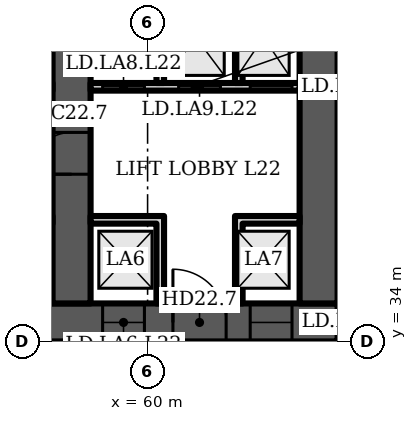
"""IFC4 building model, lengths in metres.
Left out: names, types, materials, properties, quantities, classifications, styles, units other than length and angle.
Written with IfcOpenShell. Run it as: python <this file> out.ifc"""

import sys

from ifc_helpers import new_model, si_unit, direction, frame, frame_2d, origin, place, context, subcontext, project, spatial, polyline, rectangle, outline, extrude, element, fill, save


model = new_model("IFC4")
c1 = context("Model", 3, precision=1e-05, world=origin(), true_north=direction((0.0, 1.0)))
c2 = subcontext(c1, "Body", "Model", "MODEL_VIEW")
j1 = project(units=[si_unit("LENGTHUNIT", "METRE"), si_unit("PLANEANGLEUNIT", "RADIAN")], contexts=[c1])
p1 = place(None, origin())
s1 = spatial("IfcSite", under=j1, at=p1, CompositionType="ELEMENT")
p2 = place(p1, origin())
s2 = spatial("IfcBuilding", under=s1, at=p2, CompositionType="ELEMENT")
p3 = place(p2, frame((0.0, 0.0, 100.3)))
s3 = spatial("IfcBuildingStorey", under=s2, at=p3, CompositionType="ELEMENT", Elevation=100.3)
p4 = place(p3, frame((16.0, 34.5, 0.0), z_axis=(0.0, 0.0, 1.0), x_axis=(1.0, 0.0, 0.0)))
e1 = element("IfcWall", 1, at=p4, inside=s3, PredefinedType="SHEAR", context=c2, shape_type="SweptSolid", body=[
    extrude(rectangle(XDim=49.0, YDim=1.0, at=frame_2d((24.5, 0.0))), origin(), (0.0, 0.0, 1.0), 3.6),
])
p5 = place(p4, frame((1.2, 0.0, 0.0)))
e2 = element("IfcOpeningElement", 2, at=p5, cuts=e1, PredefinedType="OPENING", context=c2, shape_type="SweptSolid", body=[
    extrude(rectangle(XDim=1.1, YDim=2.1, at=frame_2d((0.55, 1.05))), frame((0.0, 0.51, 0.0), z_axis=(0.0, -1.0, 0.0), x_axis=(1.0, 0.0, 0.0)), (0.0, 0.0, 1.0), 1.02),
])
p6 = place(p4, frame((5.083, 0.0, 0.0)))
e3 = element("IfcOpeningElement", 3, at=p6, cuts=e1, PredefinedType="OPENING", context=c2, shape_type="SweptSolid", body=[
    extrude(rectangle(XDim=1.1, YDim=2.1, at=frame_2d((0.55, 1.05))), frame((0.0, 0.51, 0.0), z_axis=(0.0, -1.0, 0.0), x_axis=(1.0, 0.0, 0.0)), (0.0, 0.0, 1.0), 1.02),
])
p7 = place(p4, frame((2.933, 0.0, 0.0)))
e4 = element("IfcOpeningElement", 4, at=p7, cuts=e1, PredefinedType="OPENING", context=c2, shape_type="SweptSolid", body=[
    extrude(rectangle(XDim=1.4, YDim=2.1, at=frame_2d((0.7, 1.05))), frame((0.0, 0.51, 0.0), z_axis=(0.0, -1.0, 0.0), x_axis=(1.0, 0.0, 0.0)), (0.0, 0.0, 1.0), 1.02),
])
p8 = place(p4, frame((7.65, 0.0, 0.0)))
e5 = element("IfcOpeningElement", 5, at=p8, cuts=e1, PredefinedType="OPENING", context=c2, shape_type="SweptSolid", body=[
    extrude(rectangle(XDim=1.2, YDim=2.1, at=frame_2d((0.6, 1.05))), frame((0.0, 0.51, 0.0), z_axis=(0.0, -1.0, 0.0), x_axis=(1.0, 0.0, 0.0)), (0.0, 0.0, 1.0), 1.02),
])
p9 = place(p4, frame((14.817, 0.0, 0.0)))
e6 = element("IfcOpeningElement", 6, at=p9, cuts=e1, PredefinedType="OPENING", context=c2, shape_type="SweptSolid", body=[
    extrude(rectangle(XDim=1.1, YDim=2.1, at=frame_2d((0.55, 1.05))), frame((0.0, 0.51, 0.0), z_axis=(0.0, -1.0, 0.0), x_axis=(1.0, 0.0, 0.0)), (0.0, 0.0, 1.0), 1.02),
])
p10 = place(p4, frame((19.083, 0.0, 0.0)))
e7 = element("IfcOpeningElement", 7, at=p10, cuts=e1, PredefinedType="OPENING", context=c2, shape_type="SweptSolid", body=[
    extrude(rectangle(XDim=1.1, YDim=2.1, at=frame_2d((0.55, 1.05))), frame((0.0, 0.51, 0.0), z_axis=(0.0, -1.0, 0.0), x_axis=(1.0, 0.0, 0.0)), (0.0, 0.0, 1.0), 1.02),
])
p11 = place(p4, frame((16.8, 0.0, 0.0)))
e8 = element("IfcOpeningElement", 8, at=p11, cuts=e1, PredefinedType="OPENING", context=c2, shape_type="SweptSolid", body=[
    extrude(rectangle(XDim=1.4, YDim=2.1, at=frame_2d((0.7, 1.05))), frame((0.0, 0.51, 0.0), z_axis=(0.0, -1.0, 0.0), x_axis=(1.0, 0.0, 0.0)), (0.0, 0.0, 1.0), 1.02),
])
p12 = place(p4, frame((21.817, 0.0, 0.0)))
e9 = element("IfcOpeningElement", 9, at=p12, cuts=e1, PredefinedType="OPENING", context=c2, shape_type="SweptSolid", body=[
    extrude(rectangle(XDim=1.1, YDim=2.1, at=frame_2d((0.55, 1.05))), frame((0.0, 0.51, 0.0), z_axis=(0.0, -1.0, 0.0), x_axis=(1.0, 0.0, 0.0)), (0.0, 0.0, 1.0), 1.02),
])
p13 = place(p4, frame((26.083, 0.0, 0.0)))
e10 = element("IfcOpeningElement", 10, at=p13, cuts=e1, PredefinedType="OPENING", context=c2, shape_type="SweptSolid", body=[
    extrude(rectangle(XDim=1.1, YDim=2.1, at=frame_2d((0.55, 1.05))), frame((0.0, 0.51, 0.0), z_axis=(0.0, -1.0, 0.0), x_axis=(1.0, 0.0, 0.0)), (0.0, 0.0, 1.0), 1.02),
])
p14 = place(p4, frame((33.15, 0.0, 0.0)))
e11 = element("IfcOpeningElement", 11, at=p14, cuts=e1, PredefinedType="OPENING", context=c2, shape_type="SweptSolid", body=[
    extrude(rectangle(XDim=1.2, YDim=2.1, at=frame_2d((0.6, 1.05))), frame((0.0, 0.51, 0.0), z_axis=(0.0, -1.0, 0.0), x_axis=(1.0, 0.0, 0.0)), (0.0, 0.0, 1.0), 1.02),
])
p15 = place(p4, frame((37.8, 0.0, 0.0)))
e12 = element("IfcOpeningElement", 12, at=p15, cuts=e1, PredefinedType="OPENING", context=c2, shape_type="SweptSolid", body=[
    extrude(rectangle(XDim=1.4, YDim=2.1, at=frame_2d((0.7, 1.05))), frame((0.0, 0.51, 0.0), z_axis=(0.0, -1.0, 0.0), x_axis=(1.0, 0.0, 0.0)), (0.0, 0.0, 1.0), 1.02),
])
p16 = place(p4, frame((42.817, 0.0, 0.0)))
e13 = element("IfcOpeningElement", 13, at=p16, cuts=e1, PredefinedType="OPENING", context=c2, shape_type="SweptSolid", body=[
    extrude(rectangle(XDim=1.1, YDim=2.1, at=frame_2d((0.55, 1.05))), frame((0.0, 0.51, 0.0), z_axis=(0.0, -1.0, 0.0), x_axis=(1.0, 0.0, 0.0)), (0.0, 0.0, 1.0), 1.02),
])
p17 = place(p4, frame((46.7, 0.0, 0.0)))
e14 = element("IfcOpeningElement", 14, at=p17, cuts=e1, PredefinedType="OPENING", context=c2, shape_type="SweptSolid", body=[
    extrude(rectangle(XDim=1.1, YDim=2.1, at=frame_2d((0.55, 1.05))), frame((0.0, 0.51, 0.0), z_axis=(0.0, -1.0, 0.0), x_axis=(1.0, 0.0, 0.0)), (0.0, 0.0, 1.0), 1.02),
])
p18 = place(p4, frame((44.667, 0.0, 0.0)))
e15 = element("IfcOpeningElement", 15, at=p18, cuts=e1, PredefinedType="OPENING", context=c2, shape_type="SweptSolid", body=[
    extrude(rectangle(XDim=1.4, YDim=2.1, at=frame_2d((0.7, 1.05))), frame((0.0, 0.51, 0.0), z_axis=(0.0, -1.0, 0.0), x_axis=(1.0, 0.0, 0.0)), (0.0, 0.0, 1.0), 1.02),
])
p19 = place(p3, frame((58.0, 35.0, 0.0), z_axis=(0.0, 0.0, 1.0), x_axis=(0.0, 1.0, 0.0)))
e16 = element("IfcWall", 16, at=p19, inside=s3, PredefinedType="SHEAR", context=c2, shape_type="SweptSolid", body=[
    extrude(rectangle(XDim=13.352, YDim=1.0, at=frame_2d((6.676, 0.0))), origin(), (0.0, 0.0, 1.0), 3.6),
])
p20 = place(p19, frame((10.426, 0.0, 0.0)))
e17 = element("IfcOpeningElement", 17, at=p20, cuts=e16, PredefinedType="OPENING", context=c2, shape_type="SweptSolid", body=[
    extrude(rectangle(XDim=1.0, YDim=2.1, at=frame_2d((0.5, 1.05))), frame((0.0, 0.51, 0.0), z_axis=(0.0, -1.0, 0.0), x_axis=(1.0, 0.0, 0.0)), (0.0, 0.0, 1.0), 1.02),
])
p21 = place(p19, frame((3.4, 0.0, 0.0)))
e18 = element("IfcOpeningElement", 18, at=p21, cuts=e16, PredefinedType="OPENING", context=c2, shape_type="SweptSolid", body=[
    extrude(rectangle(XDim=1.1, YDim=2.1, at=frame_2d((0.55, 1.05))), frame((0.0, 0.51, 0.0), z_axis=(0.0, -1.0, 0.0), x_axis=(1.0, 0.0, 0.0)), (0.0, 0.0, 1.0), 1.02),
])
p22 = place(p3, frame((64.5, 35.0, 0.0), z_axis=(0.0, 0.0, 1.0), x_axis=(0.0, 1.0, 0.0)))
e19 = element("IfcWall", 19, at=p22, inside=s3, PredefinedType="SHEAR", context=c2, shape_type="SweptSolid", body=[
    extrude(rectangle(XDim=12.784, YDim=1.0, at=frame_2d((6.392, 0.0))), origin(), (0.0, 0.0, 1.0), 3.6),
])
p23 = place(p3, frame((58.5, 40.7, 0.0), z_axis=(0.0, 0.0, 1.0), x_axis=(1.0, 0.0, 0.0)))
e20 = element("IfcWall", 20, at=p23, inside=s3, PredefinedType="PARTITIONING", context=c2, shape_type="SweptSolid", body=[
    extrude(rectangle(XDim=5.5, YDim=0.2, at=frame_2d((2.75, 0.0))), origin(), (0.0, 0.0, 1.0), 3.2),
])
p24 = place(p23, frame((0.317, 0.0, 0.0)))
e21 = element("IfcOpeningElement", 21, at=p24, cuts=e20, PredefinedType="OPENING", context=c2, shape_type="SweptSolid", body=[
    extrude(rectangle(XDim=1.1, YDim=2.1, at=frame_2d((0.55, 1.05))), frame((0.0, 0.11, 0.0), z_axis=(0.0, -1.0, 0.0), x_axis=(1.0, 0.0, 0.0)), (0.0, 0.0, 1.0), 0.22),
])
p25 = place(p23, frame((2.317, 0.0, 0.0)))
e22 = element("IfcOpeningElement", 22, at=p25, cuts=e20, PredefinedType="OPENING", context=c2, shape_type="SweptSolid", body=[
    extrude(rectangle(XDim=1.1, YDim=2.1, at=frame_2d((0.55, 1.05))), frame((0.0, 0.11, 0.0), z_axis=(0.0, -1.0, 0.0), x_axis=(1.0, 0.0, 0.0)), (0.0, 0.0, 1.0), 0.22),
])
p26 = place(p23, frame((4.2, 0.0, 0.0)))
e23 = element("IfcOpeningElement", 23, at=p26, cuts=e20, PredefinedType="OPENING", context=c2, shape_type="SweptSolid", body=[
    extrude(rectangle(XDim=1.1, YDim=2.1, at=frame_2d((0.55, 1.05))), frame((0.0, 0.11, 0.0), z_axis=(0.0, -1.0, 0.0), x_axis=(1.0, 0.0, 0.0)), (0.0, 0.0, 1.0), 0.22),
])
p27 = place(p3, frame((0.0, 0.0, -0.0)))
e24 = element("IfcWall", 24, at=p27, inside=s3, PredefinedType="PARTITIONING", context=c2, shape_type="SweptSolid", body=[
    extrude(outline(polyline([(60.233, 37.1), (58.5, 37.1), (58.5, 37.3), (60.233, 37.3), (60.433, 37.3), (60.433, 35.0), (60.233, 35.0), (60.233, 37.1)])), origin(), (0.0, 0.0, 1.0), 3.2),
])
p28 = place(p3, frame((0.0, 0.0, -0.0)))
e25 = element("IfcWall", 25, at=p28, inside=s3, PredefinedType="PARTITIONING", context=c2, shape_type="SweptSolid", body=[
    extrude(outline(polyline([(62.3, 37.3), (62.5, 37.3), (64.0, 37.3), (64.0, 37.1), (62.5, 37.1), (62.5, 35.0), (62.3, 35.0), (62.3, 37.3)])), origin(), (0.0, 0.0, 1.0), 3.2),
])
p29 = place(p3, frame((0.0, 0.0, -0.0)))
e26 = element("IfcWall", 26, at=p29, inside=s3, PredefinedType="PARTITIONING", context=c2, shape_type="SweptSolid", body=[
    extrude(outline(polyline([(60.433, 40.8), (60.233, 40.8), (60.233, 43.8), (58.5, 43.8), (58.5, 44.0), (64.0, 44.0), (64.0, 43.8), (62.5, 43.8), (62.5, 40.8), (62.3, 40.8), (62.3, 43.8), (60.433, 43.8), (60.433, 40.8)])), origin(), (0.0, 0.0, 1.0), 3.2),
])
p30 = place(p16, origin())
e27 = element("IfcDoor", 27, at=p30, inside=s3, OperationType="DOUBLE_DOOR_SLIDING", PredefinedType="DOOR", context=c2, shape_type="SweptSolid", body=[
    extrude(rectangle(XDim=1.1, YDim=2.1, at=frame_2d((0.55, 1.05))), frame((0.0, 0.025, 0.0), z_axis=(0.0, -1.0, 0.0), x_axis=(1.0, 0.0, 0.0)), (0.0, 0.0, 1.0), 0.05),
])
fill(e13, e27)
p31 = place(p17, origin())
e28 = element("IfcDoor", 28, at=p31, inside=s3, OperationType="DOUBLE_DOOR_SLIDING", PredefinedType="DOOR", context=c2, shape_type="SweptSolid", body=[
    extrude(rectangle(XDim=1.1, YDim=2.1, at=frame_2d((0.55, 1.05))), frame((0.0, 0.025, 0.0), z_axis=(0.0, -1.0, 0.0), x_axis=(1.0, 0.0, 0.0)), (0.0, 0.0, 1.0), 0.05),
])
fill(e14, e28)
p32 = place(p18, origin())
e29 = element("IfcDoor", 29, at=p32, inside=s3, OperationType="DOUBLE_DOOR_SINGLE_SWING", PredefinedType="DOOR", context=c2, shape_type="SweptSolid", body=[
    extrude(rectangle(XDim=1.4, YDim=2.1, at=frame_2d((0.7, 1.05))), frame((0.0, 0.025, 0.0), z_axis=(0.0, -1.0, 0.0), x_axis=(1.0, 0.0, 0.0)), (0.0, 0.0, 1.0), 0.05),
])
fill(e15, e29)
p33 = place(p24, origin())
e30 = element("IfcDoor", 30, at=p33, inside=s3, OperationType="DOUBLE_DOOR_SLIDING", PredefinedType="DOOR", context=c2, shape_type="SweptSolid", body=[
    extrude(rectangle(XDim=1.1, YDim=2.1, at=frame_2d((0.55, 1.05))), frame((0.0, 0.025, 0.0), z_axis=(0.0, -1.0, 0.0), x_axis=(1.0, 0.0, 0.0)), (0.0, 0.0, 1.0), 0.05),
])
fill(e21, e30)
p34 = place(p25, origin())
e31 = element("IfcDoor", 31, at=p34, inside=s3, OperationType="DOUBLE_DOOR_SLIDING", PredefinedType="DOOR", context=c2, shape_type="SweptSolid", body=[
    extrude(rectangle(XDim=1.1, YDim=2.1, at=frame_2d((0.55, 1.05))), frame((0.0, 0.025, 0.0), z_axis=(0.0, -1.0, 0.0), x_axis=(1.0, 0.0, 0.0)), (0.0, 0.0, 1.0), 0.05),
])
fill(e22, e31)
p35 = place(p26, origin())
e32 = element("IfcDoor", 32, at=p35, inside=s3, OperationType="DOUBLE_DOOR_SLIDING", PredefinedType="DOOR", context=c2, shape_type="SweptSolid", body=[
    extrude(rectangle(XDim=1.1, YDim=2.1, at=frame_2d((0.55, 1.05))), frame((0.0, 0.025, 0.0), z_axis=(0.0, -1.0, 0.0), x_axis=(1.0, 0.0, 0.0)), (0.0, 0.0, 1.0), 0.05),
])
fill(e23, e32)
p36 = place(p21, origin())
e33 = element("IfcDoor", 33, at=p36, inside=s3, OperationType="SINGLE_SWING_LEFT", PredefinedType="DOOR", context=c2, shape_type="SweptSolid", body=[
    extrude(rectangle(XDim=1.1, YDim=2.1, at=frame_2d((0.55, 1.05))), frame((0.0, 0.025, 0.0), z_axis=(0.0, -1.0, 0.0), x_axis=(1.0, 0.0, 0.0)), (0.0, 0.0, 1.0), 0.05),
])
fill(e18, e33)
save(model, sys.argv[1])
